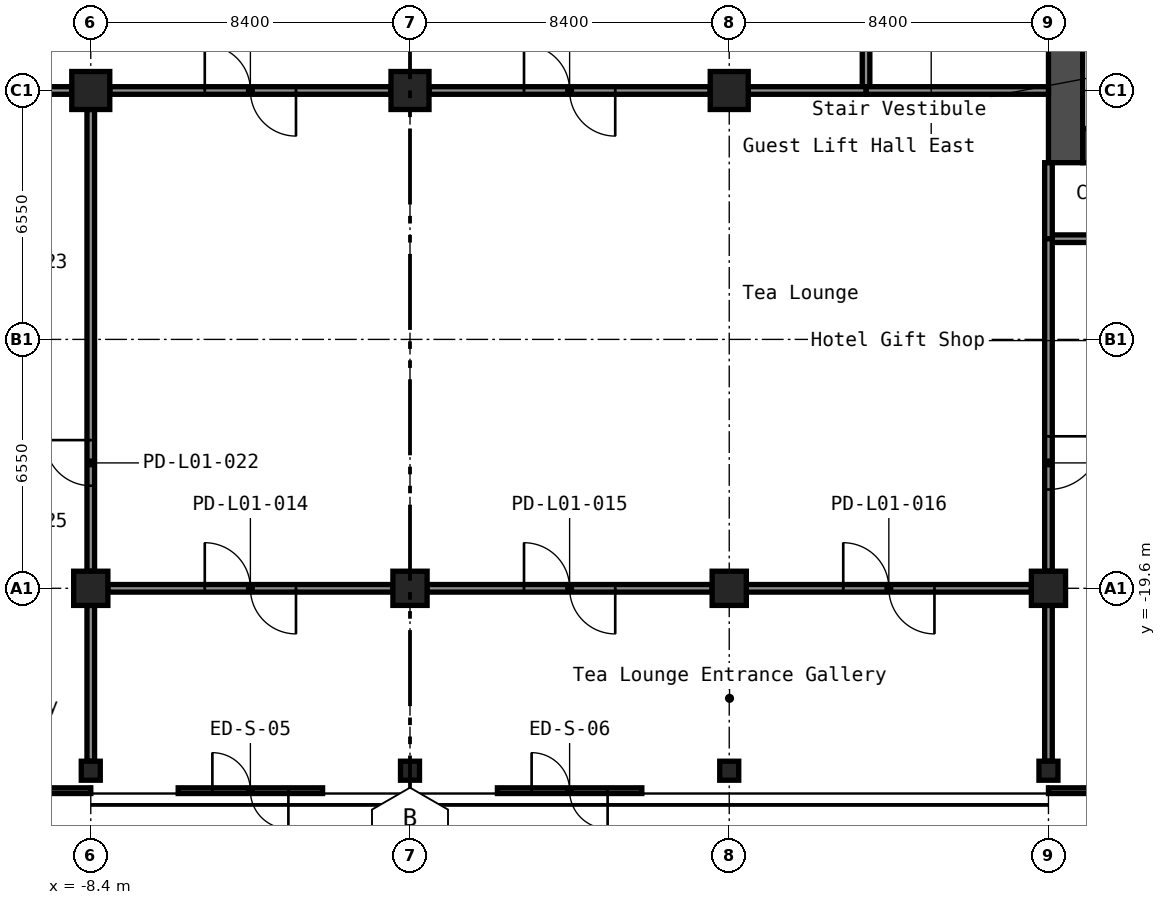
"""IFC4 building model, lengths in metres.
Left out: names, types, materials, properties, quantities, classifications, styles, units other than length and angle.
Written with IfcOpenShell. Run it as: python <this file> out.ifc"""

import sys

from ifc_helpers import new_model, si_unit, direction, frame, frame_2d, origin, origin_2d, place, context, subcontext, project, spatial, rectangle, hollow_rectangle, extrude, element, fill, save


model = new_model("IFC4")
c1 = context("Model", 3, precision=1e-05, world=origin(), true_north=direction((0.0, 1.0)))
c2 = subcontext(c1, "Body", "Model", "MODEL_VIEW")
j1 = project(units=[si_unit("LENGTHUNIT", "METRE"), si_unit("PLANEANGLEUNIT", "RADIAN")], contexts=[c1])
p1 = place(None, origin())
s1 = spatial("IfcSite", under=j1, at=p1, CompositionType="ELEMENT")
p2 = place(p1, origin())
s2 = spatial("IfcBuilding", under=s1, at=p2, CompositionType="ELEMENT")
p3 = place(p2, origin())
s3 = spatial("IfcBuildingStorey", under=s2, at=p3, CompositionType="ELEMENT", Elevation=0.0)
p4 = place(p3, frame((-8.4, -19.6, -0.3), z_axis=(0.0, 0.0, 1.0), x_axis=(1.0, 0.0, 0.0)))
e1 = element("IfcColumn", 1, at=p4, inside=s3, PredefinedType="COLUMN", context=c2, shape_type="SweptSolid", body=[
    extrude(hollow_rectangle(XDim=0.9, YDim=0.9, WallThickness=0.036, at=origin_2d()), origin(), (0.0, 0.0, 1.0), 8.9),
])
p5 = place(p3, frame((-8.4, -6.5, -0.3), z_axis=(0.0, 0.0, 1.0), x_axis=(1.0, 0.0, 0.0)))
e2 = element("IfcColumn", 2, at=p5, inside=s3, PredefinedType="COLUMN", context=c2, shape_type="SweptSolid", body=[
    extrude(hollow_rectangle(XDim=1.0, YDim=1.0, WallThickness=0.04, at=origin_2d()), origin(), (0.0, 0.0, 1.0), 8.9),
])
p6 = place(p3, frame((0.0, -19.6, -0.3), z_axis=(0.0, 0.0, 1.0), x_axis=(1.0, 0.0, 0.0)))
e3 = element("IfcColumn", 3, at=p6, inside=s3, PredefinedType="COLUMN", context=c2, shape_type="SweptSolid", body=[
    extrude(hollow_rectangle(XDim=0.9, YDim=0.9, WallThickness=0.036, at=origin_2d()), origin(), (0.0, 0.0, 1.0), 8.9),
])
p7 = place(p3, frame((0.0, -6.5, -0.3), z_axis=(0.0, 0.0, 1.0), x_axis=(1.0, 0.0, 0.0)))
e4 = element("IfcColumn", 4, at=p7, inside=s3, PredefinedType="COLUMN", context=c2, shape_type="SweptSolid", body=[
    extrude(hollow_rectangle(XDim=1.0, YDim=1.0, WallThickness=0.04, at=origin_2d()), origin(), (0.0, 0.0, 1.0), 8.9),
])
p8 = place(p3, frame((8.4, -19.6, -0.3), z_axis=(0.0, 0.0, 1.0), x_axis=(1.0, 0.0, 0.0)))
e5 = element("IfcColumn", 5, at=p8, inside=s3, PredefinedType="COLUMN", context=c2, shape_type="SweptSolid", body=[
    extrude(hollow_rectangle(XDim=0.9, YDim=0.9, WallThickness=0.036, at=origin_2d()), origin(), (0.0, 0.0, 1.0), 8.9),
])
p9 = place(p3, frame((8.4, -6.5, -0.3), z_axis=(0.0, 0.0, 1.0), x_axis=(1.0, 0.0, 0.0)))
e6 = element("IfcColumn", 6, at=p9, inside=s3, PredefinedType="COLUMN", context=c2, shape_type="SweptSolid", body=[
    extrude(hollow_rectangle(XDim=1.0, YDim=1.0, WallThickness=0.04, at=origin_2d()), origin(), (0.0, 0.0, 1.0), 8.9),
])
p10 = place(p3, frame((16.8, -19.6, -0.3), z_axis=(0.0, 0.0, 1.0), x_axis=(1.0, 0.0, 0.0)))
e7 = element("IfcColumn", 7, at=p10, inside=s3, PredefinedType="COLUMN", context=c2, shape_type="SweptSolid", body=[
    extrude(hollow_rectangle(XDim=0.9, YDim=0.9, WallThickness=0.036, at=origin_2d()), origin(), (0.0, 0.0, 1.0), 8.9),
])
for number, where, z_axis, x_axis in (
    (8, (-8.4, -24.4, -0.3), (0.0, 0.0, 1.0), (1.0, 0.0, 0.0)),
    (9, (0.0, -24.4, -0.3), (0.0, 0.0, 1.0), (1.0, 0.0, 0.0)),
    (10, (8.4, -24.4, -0.3), (0.0, 0.0, 1.0), (1.0, 0.0, 0.0)),
    (11, (16.8, -24.4, -0.3), (0.0, 0.0, 1.0), (1.0, 0.0, 0.0)),
):
    element("IfcColumn", number, at=place(p3, frame(where, z_axis=z_axis, x_axis=x_axis)), inside=s3, PredefinedType="COLUMN", context=c2, shape_type="SweptSolid", body=[
        extrude(hollow_rectangle(XDim=0.5, YDim=0.5, WallThickness=0.019, InnerFilletRadius=0.029, OuterFilletRadius=0.048, at=origin_2d()), origin(), (0.0, 0.0, 1.0), 8.9),
    ])
p11 = place(p3, frame((17.25, -8.4, 0.0), z_axis=(0.0, 0.0, 1.0), x_axis=(0.0, 1.0, 0.0)))
e12 = element("IfcWall", 12, at=p11, inside=s3, PredefinedType="SHEAR", context=c2, shape_type="SweptSolid", body=[
    extrude(rectangle(XDim=16.8, YDim=0.9, at=frame_2d((8.4, 0.0))), origin(), (0.0, 0.0, 1.0), 8.6),
])
p12 = place(p11, frame((3.4, 0.0, 0.0)))
e13 = element("IfcOpeningElement", 13, at=p12, cuts=e12, PredefinedType="OPENING", context=c2, shape_type="SweptSolid", body=[
    extrude(rectangle(XDim=1.6, YDim=2.1, at=frame_2d((0.8, 1.05))), frame((0.0, 0.46, 0.0), z_axis=(0.0, -1.0, 0.0), x_axis=(1.0, 0.0, 0.0)), (0.0, 0.0, 1.0), 0.92),
])
p13 = place(p11, frame((9.6, 0.0, 0.0)))
e14 = element("IfcOpeningElement", 14, at=p13, cuts=e12, PredefinedType="OPENING", context=c2, shape_type="SweptSolid", body=[
    extrude(rectangle(XDim=1.6, YDim=2.1, at=frame_2d((0.8, 1.05))), frame((0.0, 0.46, 0.0), z_axis=(0.0, -1.0, 0.0), x_axis=(1.0, 0.0, 0.0)), (0.0, 0.0, 1.0), 0.92),
])
p14 = place(p11, frame((11.8, 0.0, 0.0)))
e15 = element("IfcOpeningElement", 15, at=p14, cuts=e12, PredefinedType="OPENING", context=c2, shape_type="SweptSolid", body=[
    extrude(rectangle(XDim=1.6, YDim=2.1, at=frame_2d((0.8, 1.05))), frame((0.0, 0.46, 0.0), z_axis=(0.0, -1.0, 0.0), x_axis=(1.0, 0.0, 0.0)), (0.0, 0.0, 1.0), 0.92),
])
p15 = place(p3, frame((17.7, -7.95, 0.0), z_axis=(0.0, 0.0, 1.0), x_axis=(1.0, 0.0, 0.0)))
e16 = element("IfcWall", 16, at=p15, inside=s3, PredefinedType="SHEAR", context=c2, shape_type="SweptSolid", body=[
    extrude(rectangle(XDim=15.0, YDim=0.9, at=frame_2d((7.5, 0.0))), origin(), (0.0, 0.0, 1.0), 8.6),
])
p16 = place(p15, frame((2.55, 0.0, 0.0)))
e17 = element("IfcOpeningElement", 17, at=p16, cuts=e16, PredefinedType="OPENING", context=c2, shape_type="SweptSolid", body=[
    extrude(rectangle(XDim=1.0, YDim=2.1, at=frame_2d((0.5, 1.05))), frame((0.0, 0.46, 0.0), z_axis=(0.0, -1.0, 0.0), x_axis=(1.0, 0.0, 0.0)), (0.0, 0.0, 1.0), 0.92),
])
p17 = place(p15, frame((4.2, 0.0, 0.0)))
e18 = element("IfcOpeningElement", 18, at=p17, cuts=e16, PredefinedType="OPENING", context=c2, shape_type="SweptSolid", body=[
    extrude(rectangle(XDim=1.2, YDim=2.1, at=frame_2d((0.6, 1.05))), frame((0.0, 0.46, 0.0), z_axis=(0.0, -1.0, 0.0), x_axis=(1.0, 0.0, 0.0)), (0.0, 0.0, 1.0), 0.92),
])
p18 = place(p3, frame((22.3, -10.4, 0.0), z_axis=(0.0, 0.0, 1.0), x_axis=(-1.0, 0.0, 0.0)))
e19 = element("IfcWall", 19, at=p18, inside=s3, PredefinedType="PARTITIONING", context=c2, shape_type="SweptSolid", body=[
    extrude(rectangle(XDim=5.4, YDim=0.2, at=frame_2d((2.7, 0.0))), origin(), (0.0, 0.0, 1.0), 8.6),
])
p19 = place(p3, frame((16.8, -10.4, 0.0), z_axis=(0.0, 0.0, 1.0), x_axis=(0.0, 1.0, 0.0)))
e20 = element("IfcWall", 20, at=p19, inside=s3, PredefinedType="PARTITIONING", context=c2, shape_type="SweptSolid", body=[
    extrude(rectangle(XDim=2.0, YDim=0.2, at=frame_2d((1.0, 0.0))), origin(), (0.0, 0.0, 1.0), 8.6),
])
p20 = place(p3, frame((12.0, -6.4, 0.0), z_axis=(0.0, 0.0, 1.0), x_axis=(0.0, 1.0, 0.0)))
e21 = element("IfcWall", 21, at=p20, inside=s3, PredefinedType="PARTITIONING", context=c2, shape_type="SweptSolid", body=[
    extrude(rectangle(XDim=12.8, YDim=0.2, at=frame_2d((6.4, 0.0))), origin(), (0.0, 0.0, 1.0), 8.6),
])
p21 = place(p20, frame((5.2, 0.0, 0.0)))
e22 = element("IfcOpeningElement", 22, at=p21, cuts=e21, PredefinedType="OPENING", context=c2, shape_type="SweptSolid", body=[
    extrude(rectangle(XDim=2.4, YDim=2.1, at=frame_2d((1.2, 1.05))), frame((0.0, 0.11, 0.0), z_axis=(0.0, -1.0, 0.0), x_axis=(1.0, 0.0, 0.0)), (0.0, 0.0, 1.0), 0.22),
])
p22 = place(p3, frame((16.8, -10.4, 0.0), z_axis=(0.0, 0.0, 1.0), x_axis=(0.0, -1.0, 0.0)))
e23 = element("IfcWall", 23, at=p22, inside=s3, PredefinedType="PARTITIONING", context=c2, shape_type="SweptSolid", body=[
    extrude(rectangle(XDim=8.75, YDim=0.2, at=frame_2d((4.375, 0.0))), origin(), (0.0, 0.0, 1.0), 8.6),
])
p23 = place(p22, frame((5.2, 0.0, 0.0)))
e24 = element("IfcOpeningElement", 24, at=p23, cuts=e23, PredefinedType="OPENING", context=c2, shape_type="SweptSolid", body=[
    extrude(rectangle(XDim=1.4, YDim=2.1, at=frame_2d((0.7, 1.05))), frame((0.0, 0.11, 0.0), z_axis=(0.0, -1.0, 0.0), x_axis=(1.0, 0.0, 0.0)), (0.0, 0.0, 1.0), 0.22),
])
p24 = place(p3, frame((12.0, -6.5, 0.0), z_axis=(0.0, 0.0, 1.0), x_axis=(1.0, 0.0, 0.0)))
e25 = element("IfcWall", 25, at=p24, inside=s3, PredefinedType="PARTITIONING", context=c2, shape_type="SweptSolid", body=[
    extrude(rectangle(XDim=4.8, YDim=0.2, at=frame_2d((2.4, 0.0))), origin(), (0.0, 0.0, 1.0), 8.6),
])
p25 = place(p3, frame((-7.9, -6.5, 0.0), z_axis=(0.0, 0.0, 1.0), x_axis=(1.0, 0.0, 0.0)))
e26 = element("IfcWall", 26, at=p25, inside=s3, PredefinedType="PARTITIONING", context=c2, shape_type="SweptSolid", body=[
    extrude(rectangle(XDim=7.4, YDim=0.2, at=frame_2d((3.7, 0.0))), origin(), (0.0, 0.0, 1.0), 8.6),
])
p26 = place(p25, frame((2.5, 0.0, 0.0)))
e27 = element("IfcOpeningElement", 27, at=p26, cuts=e26, PredefinedType="OPENING", context=c2, shape_type="SweptSolid", body=[
    extrude(rectangle(XDim=2.4, YDim=2.1, at=frame_2d((1.2, 1.05))), frame((0.0, 0.11, 0.0), z_axis=(0.0, -1.0, 0.0), x_axis=(1.0, 0.0, 0.0)), (0.0, 0.0, 1.0), 0.22),
])
p27 = place(p3, frame((0.5, -6.5, 0.0), z_axis=(0.0, 0.0, 1.0), x_axis=(1.0, 0.0, 0.0)))
e28 = element("IfcWall", 28, at=p27, inside=s3, PredefinedType="PARTITIONING", context=c2, shape_type="SweptSolid", body=[
    extrude(rectangle(XDim=7.4, YDim=0.2, at=frame_2d((3.7, 0.0))), origin(), (0.0, 0.0, 1.0), 8.6),
])
p28 = place(p27, frame((2.5, 0.0, 0.0)))
e29 = element("IfcOpeningElement", 29, at=p28, cuts=e28, PredefinedType="OPENING", context=c2, shape_type="SweptSolid", body=[
    extrude(rectangle(XDim=2.4, YDim=2.1, at=frame_2d((1.2, 1.05))), frame((0.0, 0.11, 0.0), z_axis=(0.0, -1.0, 0.0), x_axis=(1.0, 0.0, 0.0)), (0.0, 0.0, 1.0), 0.22),
])
p29 = place(p3, frame((8.9, -6.5, 0.0), z_axis=(0.0, 0.0, 1.0), x_axis=(1.0, 0.0, 0.0)))
e30 = element("IfcWall", 30, at=p29, inside=s3, PredefinedType="PARTITIONING", context=c2, shape_type="SweptSolid", body=[
    extrude(rectangle(XDim=3.1, YDim=0.2, at=frame_2d((1.55, 0.0))), origin(), (0.0, 0.0, 1.0), 8.6),
])
p30 = place(p3, frame((16.35, -19.6, 0.0), z_axis=(0.0, 0.0, 1.0), x_axis=(-1.0, 0.0, 0.0)))
e31 = element("IfcWall", 31, at=p30, inside=s3, PredefinedType="PARTITIONING", context=c2, shape_type="SweptSolid", body=[
    extrude(rectangle(XDim=7.5, YDim=0.2, at=frame_2d((3.75, 0.0))), origin(), (0.0, 0.0, 1.0), 8.6),
])
p31 = place(p30, frame((2.55, 0.0, 0.0)))
e32 = element("IfcOpeningElement", 32, at=p31, cuts=e31, PredefinedType="OPENING", context=c2, shape_type="SweptSolid", body=[
    extrude(rectangle(XDim=2.4, YDim=2.1, at=frame_2d((1.2, 1.05))), frame((0.0, 0.11, 0.0), z_axis=(0.0, -1.0, 0.0), x_axis=(1.0, 0.0, 0.0)), (0.0, 0.0, 1.0), 0.22),
])
p32 = place(p3, frame((7.95, -19.6, 0.0), z_axis=(0.0, 0.0, 1.0), x_axis=(-1.0, 0.0, 0.0)))
e33 = element("IfcWall", 33, at=p32, inside=s3, PredefinedType="PARTITIONING", context=c2, shape_type="SweptSolid", body=[
    extrude(rectangle(XDim=7.5, YDim=0.2, at=frame_2d((3.75, 0.0))), origin(), (0.0, 0.0, 1.0), 8.6),
])
p33 = place(p32, frame((2.55, 0.0, 0.0)))
e34 = element("IfcOpeningElement", 34, at=p33, cuts=e33, PredefinedType="OPENING", context=c2, shape_type="SweptSolid", body=[
    extrude(rectangle(XDim=2.4, YDim=2.1, at=frame_2d((1.2, 1.05))), frame((0.0, 0.11, 0.0), z_axis=(0.0, -1.0, 0.0), x_axis=(1.0, 0.0, 0.0)), (0.0, 0.0, 1.0), 0.22),
])
p34 = place(p3, frame((-0.45, -19.6, 0.0), z_axis=(0.0, 0.0, 1.0), x_axis=(-1.0, 0.0, 0.0)))
e35 = element("IfcWall", 35, at=p34, inside=s3, PredefinedType="PARTITIONING", context=c2, shape_type="SweptSolid", body=[
    extrude(rectangle(XDim=7.5, YDim=0.2, at=frame_2d((3.75, 0.0))), origin(), (0.0, 0.0, 1.0), 8.6),
])
p35 = place(p34, frame((2.55, 0.0, 0.0)))
e36 = element("IfcOpeningElement", 36, at=p35, cuts=e35, PredefinedType="OPENING", context=c2, shape_type="SweptSolid", body=[
    extrude(rectangle(XDim=2.4, YDim=2.1, at=frame_2d((1.2, 1.05))), frame((0.0, 0.11, 0.0), z_axis=(0.0, -1.0, 0.0), x_axis=(1.0, 0.0, 0.0)), (0.0, 0.0, 1.0), 0.22),
])
p36 = place(p3, frame((16.8, -20.05, 0.0), z_axis=(0.0, 0.0, 1.0), x_axis=(0.0, -1.0, 0.0)))
e37 = element("IfcWall", 37, at=p36, inside=s3, PredefinedType="PARTITIONING", context=c2, shape_type="SweptSolid", body=[
    extrude(rectangle(XDim=4.1, YDim=0.2, at=frame_2d((2.05, 0.0))), origin(), (0.0, 0.0, 1.0), 8.6),
])
p37 = place(p3, frame((-12.0, -6.5, 0.0), z_axis=(0.0, 0.0, 1.0), x_axis=(1.0, 0.0, 0.0)))
e38 = element("IfcWall", 38, at=p37, inside=s3, PredefinedType="PARTITIONING", context=c2, shape_type="SweptSolid", body=[
    extrude(rectangle(XDim=3.1, YDim=0.2, at=frame_2d((1.55, 0.0))), origin(), (0.0, 0.0, 1.0), 8.6),
])
p38 = place(p3, frame((-8.4, -7.0, 0.0), z_axis=(0.0, 0.0, 1.0), x_axis=(0.0, -1.0, 0.0)))
e39 = element("IfcWall", 39, at=p38, inside=s3, PredefinedType="PARTITIONING", context=c2, shape_type="SweptSolid", body=[
    extrude(rectangle(XDim=12.15, YDim=0.2, at=frame_2d((6.075, 0.0))), origin(), (0.0, 0.0, 1.0), 8.6),
])
p39 = place(p38, frame((8.7, 0.0, 0.0)))
e40 = element("IfcOpeningElement", 40, at=p39, cuts=e39, PredefinedType="OPENING", context=c2, shape_type="SweptSolid", body=[
    extrude(rectangle(XDim=1.2, YDim=2.1, at=frame_2d((0.6, 1.05))), frame((0.0, 0.11, 0.0), z_axis=(0.0, -1.0, 0.0), x_axis=(1.0, 0.0, 0.0)), (0.0, 0.0, 1.0), 0.22),
])
p40 = place(p3, frame((-8.4, -20.05, 0.0), z_axis=(0.0, 0.0, 1.0), x_axis=(0.0, -1.0, 0.0)))
e41 = element("IfcWall", 41, at=p40, inside=s3, PredefinedType="PARTITIONING", context=c2, shape_type="SweptSolid", body=[
    extrude(rectangle(XDim=4.1, YDim=0.2, at=frame_2d((2.05, 0.0))), origin(), (0.0, 0.0, 1.0), 8.6),
])
p41 = place(p3, frame((51.98, -24.925, 0.0), z_axis=(0.0, 0.0, 1.0), x_axis=(-1.0, 0.0, 0.0)))
e42 = element("IfcWall", 42, at=p41, inside=s3, PredefinedType="STANDARD", context=c2, shape_type="SweptSolid", body=[
    extrude(rectangle(XDim=35.18, YDim=0.15, at=frame_2d((17.59, 0.0))), origin(), (0.0, 0.0, 1.0), 8.6),
])
p42 = place(p41, frame((8.28, 0.0, 0.0)))
e43 = element("IfcOpeningElement", 43, at=p42, cuts=e42, PredefinedType="OPENING", context=c2, shape_type="SweptSolid", body=[
    extrude(rectangle(XDim=1.4, YDim=2.1, at=frame_2d((0.7, 1.05))), frame((0.0, 0.085, 0.0), z_axis=(0.0, -1.0, 0.0), x_axis=(1.0, 0.0, 0.0)), (0.0, 0.0, 1.0), 0.17),
])
p43 = place(p41, frame((27.555, 0.0, 0.0)))
e44 = element("IfcOpeningElement", 44, at=p43, cuts=e42, PredefinedType="OPENING", context=c2, shape_type="SweptSolid", body=[
    extrude(rectangle(XDim=1.8, YDim=2.1, at=frame_2d((0.9, 1.05))), frame((0.0, 0.085, 0.0), z_axis=(0.0, -1.0, 0.0), x_axis=(1.0, 0.0, 0.0)), (0.0, 0.0, 1.0), 0.17),
])
p44 = place(p41, frame((31.53, 0.0, 0.0)))
e45 = element("IfcOpeningElement", 45, at=p44, cuts=e42, PredefinedType="OPENING", context=c2, shape_type="SweptSolid", body=[
    extrude(rectangle(XDim=1.8, YDim=2.1, at=frame_2d((0.9, 1.05))), frame((0.0, 0.085, 0.0), z_axis=(0.0, -1.0, 0.0), x_axis=(1.0, 0.0, 0.0)), (0.0, 0.0, 1.0), 0.17),
])
p45 = place(p41, frame((21.68, 0.0, 0.0)))
e46 = element("IfcOpeningElement", 46, at=p45, cuts=e42, PredefinedType="OPENING", context=c2, shape_type="SweptSolid", body=[
    extrude(rectangle(XDim=1.8, YDim=2.1, at=frame_2d((0.9, 1.05))), frame((0.0, 0.085, 0.0), z_axis=(0.0, -1.0, 0.0), x_axis=(1.0, 0.0, 0.0)), (0.0, 0.0, 1.0), 0.17),
])
p46 = place(p3, frame((6.1, -24.925, 0.0), z_axis=(0.0, 0.0, 1.0), x_axis=(-1.0, 0.0, 0.0)))
e47 = element("IfcWall", 47, at=p46, inside=s3, PredefinedType="STANDARD", context=c2, shape_type="SweptSolid", body=[
    extrude(rectangle(XDim=3.8, YDim=0.15, at=frame_2d((1.9, 0.0))), origin(), (0.0, 0.0, 1.0), 8.6),
])
p47 = place(p46, frame((0.9, 0.0, 0.0)))
e48 = element("IfcOpeningElement", 48, at=p47, cuts=e47, PredefinedType="OPENING", context=c2, shape_type="SweptSolid", body=[
    extrude(rectangle(XDim=2.0, YDim=2.1, at=frame_2d((1.0, 1.05))), frame((0.0, 0.085, 0.0), z_axis=(0.0, -1.0, 0.0), x_axis=(1.0, 0.0, 0.0)), (0.0, 0.0, 1.0), 0.17),
])
p48 = place(p3, frame((-2.3, -24.925, 0.0), z_axis=(0.0, 0.0, 1.0), x_axis=(-1.0, 0.0, 0.0)))
e49 = element("IfcWall", 49, at=p48, inside=s3, PredefinedType="STANDARD", context=c2, shape_type="SweptSolid", body=[
    extrude(rectangle(XDim=3.8, YDim=0.15, at=frame_2d((1.9, 0.0))), origin(), (0.0, 0.0, 1.0), 8.6),
])
p49 = place(p48, frame((0.9, 0.0, 0.0)))
e50 = element("IfcOpeningElement", 50, at=p49, cuts=e49, PredefinedType="OPENING", context=c2, shape_type="SweptSolid", body=[
    extrude(rectangle(XDim=2.0, YDim=2.1, at=frame_2d((1.0, 1.05))), frame((0.0, 0.085, 0.0), z_axis=(0.0, -1.0, 0.0), x_axis=(1.0, 0.0, 0.0)), (0.0, 0.0, 1.0), 0.17),
])
p50 = place(p3, frame((-8.4, -24.925, 0.0), z_axis=(0.0, 0.0, 1.0), x_axis=(-1.0, 0.0, 0.0)))
e51 = element("IfcWall", 51, at=p50, inside=s3, PredefinedType="STANDARD", context=c2, shape_type="SweptSolid", body=[
    extrude(rectangle(XDim=43.58, YDim=0.15, at=frame_2d((21.79, 0.0))), origin(), (0.0, 0.0, 1.0), 8.6),
])
p51 = place(p50, frame((33.9, 0.0, 0.0)))
e52 = element("IfcOpeningElement", 52, at=p51, cuts=e51, PredefinedType="OPENING", context=c2, shape_type="SweptSolid", body=[
    extrude(rectangle(XDim=1.4, YDim=2.1, at=frame_2d((0.7, 1.05))), frame((0.0, 0.085, 0.0), z_axis=(0.0, -1.0, 0.0), x_axis=(1.0, 0.0, 0.0)), (0.0, 0.0, 1.0), 0.17),
])
p52 = place(p50, frame((14.225, 0.0, 0.0)))
e53 = element("IfcOpeningElement", 53, at=p52, cuts=e51, PredefinedType="OPENING", context=c2, shape_type="SweptSolid", body=[
    extrude(rectangle(XDim=1.8, YDim=2.1, at=frame_2d((0.9, 1.05))), frame((0.0, 0.085, 0.0), z_axis=(0.0, -1.0, 0.0), x_axis=(1.0, 0.0, 0.0)), (0.0, 0.0, 1.0), 0.17),
])
p53 = place(p35, origin())
e54 = element("IfcDoor", 54, at=p53, inside=s3, OperationType="DOUBLE_DOOR_DOUBLE_SWING", PredefinedType="DOOR", context=c2, shape_type="SweptSolid", body=[
    extrude(rectangle(XDim=2.4, YDim=2.1, at=frame_2d((1.2, 1.05))), frame((0.0, 0.025, 0.0), z_axis=(0.0, -1.0, 0.0), x_axis=(1.0, 0.0, 0.0)), (0.0, 0.0, 1.0), 0.05),
])
fill(e36, e54)
p54 = place(p33, origin())
e55 = element("IfcDoor", 55, at=p54, inside=s3, OperationType="DOUBLE_DOOR_DOUBLE_SWING", PredefinedType="DOOR", context=c2, shape_type="SweptSolid", body=[
    extrude(rectangle(XDim=2.4, YDim=2.1, at=frame_2d((1.2, 1.05))), frame((0.0, 0.025, 0.0), z_axis=(0.0, -1.0, 0.0), x_axis=(1.0, 0.0, 0.0)), (0.0, 0.0, 1.0), 0.05),
])
fill(e34, e55)
p55 = place(p31, origin())
e56 = element("IfcDoor", 56, at=p55, inside=s3, OperationType="DOUBLE_DOOR_DOUBLE_SWING", PredefinedType="DOOR", context=c2, shape_type="SweptSolid", body=[
    extrude(rectangle(XDim=2.4, YDim=2.1, at=frame_2d((1.2, 1.05))), frame((0.0, 0.025, 0.0), z_axis=(0.0, -1.0, 0.0), x_axis=(1.0, 0.0, 0.0)), (0.0, 0.0, 1.0), 0.05),
])
fill(e32, e56)
p56 = place(p26, origin())
e57 = element("IfcDoor", 57, at=p56, inside=s3, OperationType="DOUBLE_DOOR_DOUBLE_SWING", PredefinedType="DOOR", context=c2, shape_type="SweptSolid", body=[
    extrude(rectangle(XDim=2.4, YDim=2.1, at=frame_2d((1.2, 1.05))), frame((0.0, 0.025, 0.0), z_axis=(0.0, -1.0, 0.0), x_axis=(1.0, 0.0, 0.0)), (0.0, 0.0, 1.0), 0.05),
])
fill(e27, e57)
p57 = place(p28, origin())
e58 = element("IfcDoor", 58, at=p57, inside=s3, OperationType="DOUBLE_DOOR_DOUBLE_SWING", PredefinedType="DOOR", context=c2, shape_type="SweptSolid", body=[
    extrude(rectangle(XDim=2.4, YDim=2.1, at=frame_2d((1.2, 1.05))), frame((0.0, 0.025, 0.0), z_axis=(0.0, -1.0, 0.0), x_axis=(1.0, 0.0, 0.0)), (0.0, 0.0, 1.0), 0.05),
])
fill(e29, e58)
p58 = place(p39, origin())
e59 = element("IfcDoor", 59, at=p58, inside=s3, OperationType="SINGLE_SWING_LEFT", PredefinedType="DOOR", context=c2, shape_type="SweptSolid", body=[
    extrude(rectangle(XDim=1.2, YDim=2.1, at=frame_2d((0.6, 1.05))), frame((0.0, 0.025, 0.0), z_axis=(0.0, -1.0, 0.0), x_axis=(1.0, 0.0, 0.0)), (0.0, 0.0, 1.0), 0.05),
])
fill(e40, e59)
p59 = place(p23, origin())
e60 = element("IfcDoor", 60, at=p59, inside=s3, OperationType="SINGLE_SWING_RIGHT", PredefinedType="DOOR", context=c2, shape_type="SweptSolid", body=[
    extrude(rectangle(XDim=1.4, YDim=2.1, at=frame_2d((0.7, 1.05))), frame((0.0, 0.025, 0.0), z_axis=(0.0, -1.0, 0.0), x_axis=(1.0, 0.0, 0.0)), (0.0, 0.0, 1.0), 0.05),
])
fill(e24, e60)
p60 = place(p49, origin())
e61 = element("IfcDoor", 61, at=p60, inside=s3, OperationType="DOUBLE_DOOR_DOUBLE_SWING", PredefinedType="DOOR", context=c2, shape_type="SweptSolid", body=[
    extrude(rectangle(XDim=2.0, YDim=2.1, at=frame_2d((1.0, 1.05))), frame((0.0, 0.025, 0.0), z_axis=(0.0, -1.0, 0.0), x_axis=(1.0, 0.0, 0.0)), (0.0, 0.0, 1.0), 0.05),
])
fill(e50, e61)
p61 = place(p47, origin())
e62 = element("IfcDoor", 62, at=p61, inside=s3, OperationType="DOUBLE_DOOR_DOUBLE_SWING", PredefinedType="DOOR", context=c2, shape_type="SweptSolid", body=[
    extrude(rectangle(XDim=2.0, YDim=2.1, at=frame_2d((1.0, 1.05))), frame((0.0, 0.025, 0.0), z_axis=(0.0, -1.0, 0.0), x_axis=(1.0, 0.0, 0.0)), (0.0, 0.0, 1.0), 0.05),
])
fill(e48, e62)
save(model, sys.argv[1])
